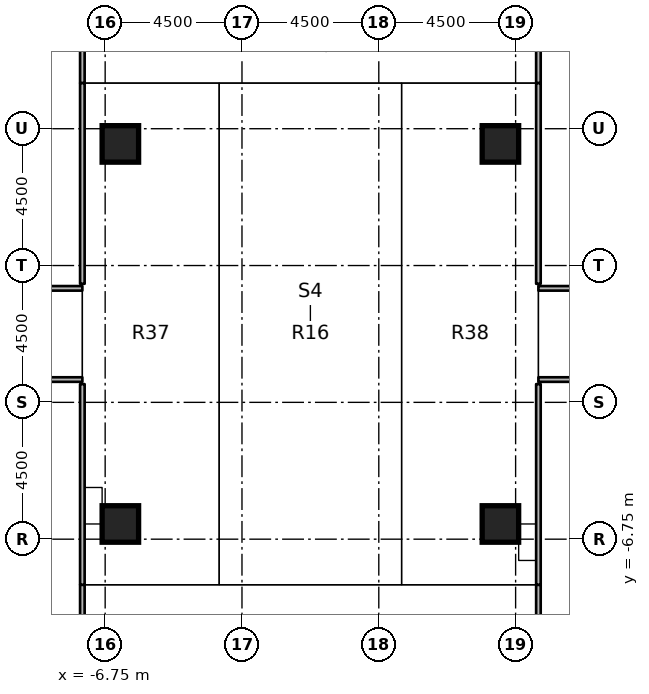
"""IFC4 building model, lengths in metres.
Left out: names, types, materials, properties, quantities, classifications, styles, units other than length and angle.
Written with IfcOpenShell. Run it as: python <this file> out.ifc"""

import sys

from ifc_helpers import new_model, si_unit, direction, frame, frame_2d, origin, origin_2d, place, context, subcontext, project, spatial, rectangle, extrude, element, save


model = new_model("IFC4")
c1 = context("Model", 3, precision=1e-05, world=origin(), true_north=direction((0.0, 1.0)))
c2 = subcontext(c1, "Body", "Model", "MODEL_VIEW")
j1 = project(units=[si_unit("LENGTHUNIT", "METRE"), si_unit("PLANEANGLEUNIT", "RADIAN")], contexts=[c1])
p1 = place(None, origin())
s1 = spatial("IfcSite", under=j1, at=p1, CompositionType="ELEMENT")
p2 = place(p1, origin())
s2 = spatial("IfcBuilding", under=s1, at=p2, CompositionType="ELEMENT")
p3 = place(p2, frame((0.0, 0.0, 12.0)))
s3 = spatial("IfcBuildingStorey", under=s2, at=p3, CompositionType="ELEMENT", Elevation=12.0)
for number, where, z_axis, x_axis in (
    (1, (-6.25, -6.25, 0.0), (0.0, 0.0, 1.0), (1.0, 0.0, 0.0)),
    (2, (-6.25, 6.25, 0.0), (0.0, 0.0, 1.0), (1.0, 0.0, 0.0)),
    (3, (6.25, -6.25, 0.0), (0.0, 0.0, 1.0), (1.0, 0.0, 0.0)),
    (4, (6.25, 6.25, 0.0), (0.0, 0.0, 1.0), (1.0, 0.0, 0.0)),
):
    element("IfcColumn", number, at=place(p3, frame(where, z_axis=z_axis, x_axis=x_axis)), inside=s3, PredefinedType="COLUMN", context=c2, shape_type="SweptSolid", body=[
        extrude(rectangle(XDim=1.2, YDim=1.2, at=origin_2d()), origin(), (0.0, 0.0, 1.0), 4.55),
    ])
p4 = place(p3, frame((7.5, 24.75, 0.0), z_axis=(0.0, 0.0, 1.0), x_axis=(0.0, -1.0, 0.0)))
e5 = element("IfcWall", 5, at=p4, inside=s3, PredefinedType="PARTITIONING", context=c2, shape_type="SweptSolid", body=[
    extrude(rectangle(XDim=16.5, YDim=0.15, at=frame_2d((8.25, 0.0))), origin(), (0.0, 0.0, 1.0), 4.55),
])
p5 = place(p4, frame((10.5, 0.0, 0.0)))
e6 = element("IfcOpeningElement", 6, at=p5, cuts=e5, PredefinedType="OPENING", context=c2, shape_type="SweptSolid", body=[
    extrude(rectangle(XDim=1.0, YDim=2.1, at=frame_2d((0.5, 1.05))), frame((0.0, 0.085, 0.0), z_axis=(0.0, -1.0, 0.0), x_axis=(1.0, 0.0, 0.0)), (0.0, 0.0, 1.0), 0.17),
])
p6 = place(p3, frame((-7.5, 8.25, 0.0), z_axis=(0.0, 0.0, 1.0), x_axis=(0.0, 1.0, 0.0)))
e7 = element("IfcWall", 7, at=p6, inside=s3, PredefinedType="PARTITIONING", context=c2, shape_type="SweptSolid", body=[
    extrude(rectangle(XDim=16.5, YDim=0.15, at=frame_2d((8.25, 0.0))), origin(), (0.0, 0.0, 1.0), 4.55),
])
p7 = place(p6, frame((5.0, 0.0, 0.0)))
e8 = element("IfcOpeningElement", 8, at=p7, cuts=e7, PredefinedType="OPENING", context=c2, shape_type="SweptSolid", body=[
    extrude(rectangle(XDim=1.0, YDim=2.1, at=frame_2d((0.5, 1.05))), frame((0.0, 0.085, 0.0), z_axis=(0.0, -1.0, 0.0), x_axis=(1.0, 0.0, 0.0)), (0.0, 0.0, 1.0), 0.17),
])
p8 = place(p3, frame((7.5, -8.25, 0.0), z_axis=(0.0, 0.0, 1.0), x_axis=(0.0, -1.0, 0.0)))
e9 = element("IfcWall", 9, at=p8, inside=s3, PredefinedType="PARTITIONING", context=c2, shape_type="SweptSolid", body=[
    extrude(rectangle(XDim=16.5, YDim=0.15, at=frame_2d((8.25, 0.0))), origin(), (0.0, 0.0, 1.0), 4.55),
])
p9 = place(p3, frame((-7.5, -24.75, 0.0), z_axis=(0.0, 0.0, 1.0), x_axis=(0.0, 1.0, 0.0)))
e10 = element("IfcWall", 10, at=p9, inside=s3, PredefinedType="PARTITIONING", context=c2, shape_type="SweptSolid", body=[
    extrude(rectangle(XDim=16.5, YDim=0.15, at=frame_2d((8.25, 0.0))), origin(), (0.0, 0.0, 1.0), 4.55),
])
p10 = place(p9, frame((7.25, 0.0, 0.0)))
e11 = element("IfcOpeningElement", 11, at=p10, cuts=e10, PredefinedType="OPENING", context=c2, shape_type="SweptSolid", body=[
    extrude(rectangle(XDim=1.0, YDim=2.1, at=frame_2d((0.5, 1.05))), frame((0.0, 0.085, 0.0), z_axis=(0.0, -1.0, 0.0), x_axis=(1.0, 0.0, 0.0)), (0.0, 0.0, 1.0), 0.17),
])
p11 = place(p3, frame((7.5, 1.5, 0.0), z_axis=(0.0, 0.0, 1.0), x_axis=(1.0, 0.0, 0.0)))
e12 = element("IfcWall", 12, at=p11, inside=s3, PredefinedType="PARTITIONING", context=c2, shape_type="SweptSolid", body=[
    extrude(rectangle(XDim=17.25, YDim=0.15, at=frame_2d((8.625, 0.0))), origin(), (0.0, 0.0, 1.0), 4.55),
])
p12 = place(p11, frame((5.25, 0.0, 0.0)))
e13 = element("IfcOpeningElement", 13, at=p12, cuts=e12, PredefinedType="OPENING", context=c2, shape_type="SweptSolid", body=[
    extrude(rectangle(XDim=1.0, YDim=2.1, at=frame_2d((0.5, 1.05))), frame((0.0, 0.085, 0.0), z_axis=(0.0, -1.0, 0.0), x_axis=(1.0, 0.0, 0.0)), (0.0, 0.0, 1.0), 0.17),
])
p13 = place(p3, frame((29.25, -1.5, 0.0), z_axis=(0.0, 0.0, 1.0), x_axis=(-1.0, 0.0, 0.0)))
e14 = element("IfcWall", 14, at=p13, inside=s3, PredefinedType="PARTITIONING", context=c2, shape_type="SweptSolid", body=[
    extrude(rectangle(XDim=21.75, YDim=0.15, at=frame_2d((10.875, 0.0))), origin(), (0.0, 0.0, 1.0), 4.55),
])
p14 = place(p13, frame((10.425, 0.0, 0.0)))
e15 = element("IfcOpeningElement", 15, at=p14, cuts=e14, PredefinedType="OPENING", context=c2, shape_type="SweptSolid", body=[
    extrude(rectangle(XDim=0.9, YDim=2.1, at=frame_2d((0.45, 1.05))), frame((0.0, 0.085, 0.0), z_axis=(0.0, -1.0, 0.0), x_axis=(1.0, 0.0, 0.0)), (0.0, 0.0, 1.0), 0.17),
])
p15 = place(p3, frame((-20.25, 1.5, 0.0), z_axis=(0.0, 0.0, 1.0), x_axis=(1.0, 0.0, 0.0)))
e16 = element("IfcWall", 16, at=p15, inside=s3, PredefinedType="PARTITIONING", context=c2, shape_type="SweptSolid", body=[
    extrude(rectangle(XDim=12.75, YDim=0.15, at=frame_2d((6.375, 0.0))), origin(), (0.0, 0.0, 1.0), 4.55),
])
p16 = place(p15, frame((8.0, 0.0, 0.0)))
e17 = element("IfcOpeningElement", 17, at=p16, cuts=e16, PredefinedType="OPENING", context=c2, shape_type="SweptSolid", body=[
    extrude(rectangle(XDim=1.0, YDim=2.1, at=frame_2d((0.5, 1.05))), frame((0.0, 0.085, 0.0), z_axis=(0.0, -1.0, 0.0), x_axis=(1.0, 0.0, 0.0)), (0.0, 0.0, 1.0), 0.17),
])
p17 = place(p3, frame((-7.5, -1.5, 0.0), z_axis=(0.0, 0.0, 1.0), x_axis=(-1.0, 0.0, 0.0)))
e18 = element("IfcWall", 18, at=p17, inside=s3, PredefinedType="PARTITIONING", context=c2, shape_type="SweptSolid", body=[
    extrude(rectangle(XDim=15.0, YDim=0.15, at=frame_2d((7.5, 0.0))), origin(), (0.0, 0.0, 1.0), 4.55),
])
for number, where, z_axis, x_axis in (
    (19, (7.5, 1.65, 0.0), (0.0, 0.0, 1.0), (0.0, 1.0, 0.0)),
    (20, (-7.5, 8.25, 0.0), (0.0, 0.0, 1.0), (0.0, -1.0, 0.0)),
    (21, (7.5, -8.25, 0.0), (0.0, 0.0, 1.0), (0.0, 1.0, 0.0)),
    (22, (-7.5, -1.65, 0.0), (0.0, 0.0, 1.0), (0.0, -1.0, 0.0)),
):
    element("IfcWall", number, at=place(p3, frame(where, z_axis=z_axis, x_axis=x_axis)), inside=s3, PredefinedType="PARTITIONING", context=c2, shape_type="SweptSolid", body=[
        extrude(rectangle(XDim=6.6, YDim=0.15, at=frame_2d((3.3, 0.0))), origin(), (0.0, 0.0, 1.0), 4.55),
    ])
save(model, sys.argv[1])
